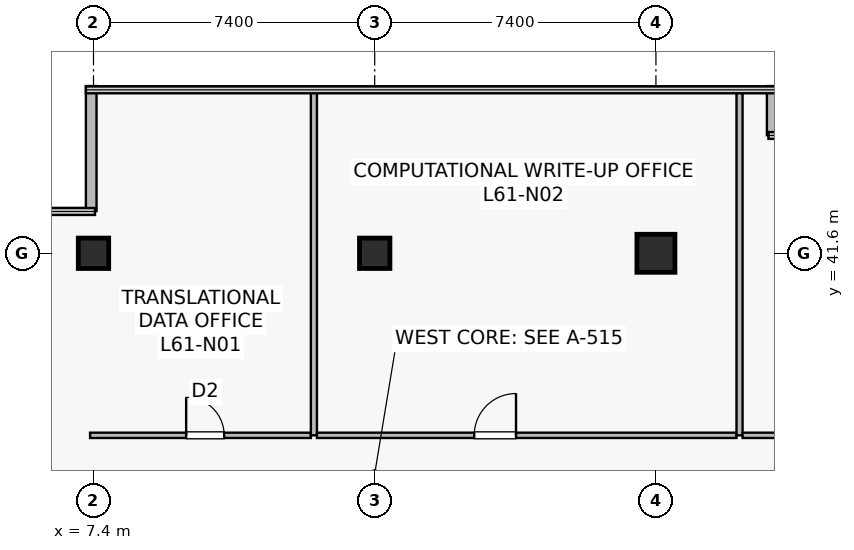
"""IFC4 building model, lengths in metres.
Left out: names, types, materials, properties, quantities, classifications, styles, units other than length and angle.
Written with IfcOpenShell. Run it as: python <this file> out.ifc"""

import sys

from ifc_helpers import new_model, si_unit, direction, frame, frame_2d, origin, origin_2d, place, context, subcontext, project, spatial, rectangle, extrude, source, transform, mapped, element, fill, save


model = new_model("IFC4")
c1 = context("Model", 3, precision=1e-05, world=origin(), true_north=direction((0.0, 1.0)))
c2 = subcontext(c1, "Body", "Model", "MODEL_VIEW")
j1 = project(units=[si_unit("LENGTHUNIT", "METRE"), si_unit("PLANEANGLEUNIT", "RADIAN")], contexts=[c1])
p1 = place(None, origin())
s1 = spatial("IfcSite", under=j1, at=p1, CompositionType="ELEMENT")
p2 = place(p1, origin())
s2 = spatial("IfcBuilding", under=s1, at=p2, CompositionType="ELEMENT")
p3 = place(p2, frame((0.0, 0.0, 254.7)))
s3 = spatial("IfcBuildingStorey", under=s2, at=p3, CompositionType="ELEMENT", Elevation=254.7)
m1 = source(origin(), c2, "Body", "SweptSolid", [
    extrude(rectangle(XDim=0.8, YDim=0.8, at=origin_2d()), origin(), (0.0, 0.0, 1.0), 4.1),
])
p4 = place(p3, frame((14.8, 41.6, 0.0), z_axis=(0.0, 0.0, 1.0), x_axis=(1.0, 0.0, 0.0)))
e1 = element("IfcColumn", 1, at=p4, inside=s3, PredefinedType="COLUMN", context=c2, shape_type="MappedRepresentation", body=[
    mapped(m1, transform((0.0, 0.0, 0.0), scale=1.0)),
])
m2 = source(origin(), c2, "Body", "SweptSolid", [
    extrude(rectangle(XDim=1.0, YDim=1.0, at=origin_2d()), origin(), (0.0, 0.0, 1.0), 4.1),
])
p5 = place(p3, frame((22.2, 41.6, 0.0), z_axis=(0.0, 0.0, 1.0), x_axis=(1.0, 0.0, 0.0)))
e2 = element("IfcColumn", 2, at=p5, inside=s3, PredefinedType="COLUMN", context=c2, shape_type="MappedRepresentation", body=[
    mapped(m2, transform((0.0, 0.0, 0.0), scale=1.0)),
])
p6 = place(p3, frame((7.4, 41.6, 0.0), z_axis=(0.0, 0.0, 1.0), x_axis=(1.0, 0.0, 0.0)))
e3 = element("IfcColumn", 3, at=p6, inside=s3, PredefinedType="COLUMN", context=c2, shape_type="MappedRepresentation", body=[
    mapped(m1, transform((0.0, 0.0, 0.0), scale=1.0)),
])
p7 = place(p3, frame((25.26, 44.707, 0.0), z_axis=(0.0, 0.0, 1.0), x_axis=(0.0, 1.0, 0.0)))
e4 = element("IfcWall", 4, at=p7, inside=s3, PredefinedType="STANDARD", context=c2, shape_type="SweptSolid", body=[
    extrude(rectangle(XDim=1.293, YDim=0.28, at=frame_2d((0.646, 0.0))), origin(), (0.0, 0.0, 1.0), 3.8),
])
p8 = place(p3, frame((7.34, 46.0, 0.0), z_axis=(0.0, 0.0, 1.0), x_axis=(0.0, -1.0, 0.0)))
e5 = element("IfcWall", 5, at=p8, inside=s3, PredefinedType="STANDARD", context=c2, shape_type="SweptSolid", body=[
    extrude(rectangle(XDim=3.288, YDim=0.28, at=frame_2d((1.644, 0.0))), origin(), (0.0, 0.0, 1.0), 3.8),
])
p9 = place(p3, frame((7.31, 36.81, 0.0), z_axis=(0.0, 0.0, 1.0), x_axis=(1.0, 0.0, 0.0)))
e6 = element("IfcWall", 6, at=p9, inside=s3, PredefinedType="PARTITIONING", context=c2, shape_type="SweptSolid", body=[
    extrude(rectangle(XDim=5.81, YDim=0.14, at=frame_2d((2.905, 0.0))), origin(), (0.0, 0.0, 1.0), 3.335),
])
p10 = place(p9, frame((2.528, 0.0, 0.0)))
e7 = element("IfcOpeningElement", 7, at=p10, cuts=e6, PredefinedType="OPENING", context=c2, shape_type="SweptSolid", body=[
    extrude(rectangle(XDim=1.0, YDim=2.15, at=frame_2d((0.5, 1.075))), frame((0.0, 0.08, 0.0), z_axis=(0.0, -1.0, 0.0), x_axis=(1.0, 0.0, 0.0)), (0.0, 0.0, 1.0), 0.16),
])
p11 = place(p3, frame((13.2, 36.81, 0.0), z_axis=(0.0, 0.0, 1.0), x_axis=(0.0, 1.0, 0.0)))
e8 = element("IfcWall", 8, at=p11, inside=s3, PredefinedType="PARTITIONING", context=c2, shape_type="SweptSolid", body=[
    extrude(rectangle(XDim=9.08, YDim=0.16, at=frame_2d((4.54, 0.0))), origin(), (0.0, 0.0, 1.0), 3.135),
])
p12 = place(p3, frame((13.28, 36.81, 0.0), z_axis=(0.0, 0.0, 1.0), x_axis=(1.0, 0.0, 0.0)))
e9 = element("IfcWall", 9, at=p12, inside=s3, PredefinedType="PARTITIONING", context=c2, shape_type="SweptSolid", body=[
    extrude(rectangle(XDim=11.04, YDim=0.14, at=frame_2d((5.52, 0.0))), origin(), (0.0, 0.0, 1.0), 3.197),
])
p13 = place(p12, frame((4.138, 0.0, 0.0)))
e10 = element("IfcOpeningElement", 10, at=p13, cuts=e9, PredefinedType="OPENING", context=c2, shape_type="SweptSolid", body=[
    extrude(rectangle(XDim=1.1, YDim=2.18, at=frame_2d((0.55, 1.09))), frame((0.0, 0.08, 0.0), z_axis=(0.0, -1.0, 0.0), x_axis=(1.0, 0.0, 0.0)), (0.0, 0.0, 1.0), 0.16),
])
p14 = place(p3, frame((24.4, 36.81, 0.0), z_axis=(0.0, 0.0, 1.0), x_axis=(0.0, 1.0, 0.0)))
e11 = element("IfcWall", 11, at=p14, inside=s3, PredefinedType="PARTITIONING", context=c2, shape_type="SweptSolid", body=[
    extrude(rectangle(XDim=9.08, YDim=0.16, at=frame_2d((4.54, 0.0))), origin(), (0.0, 0.0, 1.0), 3.135),
])
p15 = place(p3, frame((24.48, 36.81, 0.0), z_axis=(0.0, 0.0, 1.0), x_axis=(1.0, 0.0, 0.0)))
e12 = element("IfcWall", 12, at=p15, inside=s3, PredefinedType="PARTITIONING", context=c2, shape_type="SweptSolid", body=[
    extrude(rectangle(XDim=13.64, YDim=0.14, at=frame_2d((6.82, 0.0))), origin(), (0.0, 0.0, 1.0), 3.197),
])
p16 = place(p15, frame((6.625, 0.0, 0.0)))
e13 = element("IfcOpeningElement", 13, at=p16, cuts=e12, PredefinedType="OPENING", context=c2, shape_type="SweptSolid", body=[
    extrude(rectangle(XDim=1.1, YDim=2.18, at=frame_2d((0.55, 1.09))), frame((0.0, 0.08, 0.0), z_axis=(0.0, -1.0, 0.0), x_axis=(1.0, 0.0, 0.0)), (0.0, 0.0, 1.0), 0.16),
])
m3 = source(origin(), c2, "Body", "SweptSolid", [
    extrude(rectangle(XDim=1.0, YDim=2.15, at=frame_2d((0.5, 1.075))), frame((0.0, 0.025, 0.0), z_axis=(0.0, -1.0, 0.0), x_axis=(1.0, 0.0, 0.0)), (0.0, 0.0, 1.0), 0.05),
])
p17 = place(p10, origin())
e14 = element("IfcDoor", 14, at=p17, inside=s3, OperationType="SINGLE_SWING_LEFT", PredefinedType="DOOR", context=c2, shape_type="MappedRepresentation", body=[
    mapped(m3, transform((0.0, 0.0, 0.0), scale=1.0)),
])
fill(e7, e14)
m4 = source(origin(), c2, "Body", "SweptSolid", [
    extrude(rectangle(XDim=1.1, YDim=2.18, at=frame_2d((0.55, 1.09))), frame((0.0, 0.025, 0.0), z_axis=(0.0, -1.0, 0.0), x_axis=(1.0, 0.0, 0.0)), (0.0, 0.0, 1.0), 0.05),
])
p18 = place(p13, origin())
e15 = element("IfcDoor", 15, at=p18, inside=s3, OperationType="SINGLE_SWING_RIGHT", PredefinedType="DOOR", context=c2, shape_type="MappedRepresentation", body=[
    mapped(m4, transform((0.0, 0.0, 0.0), scale=1.0)),
])
fill(e10, e15)
save(model, sys.argv[1])
